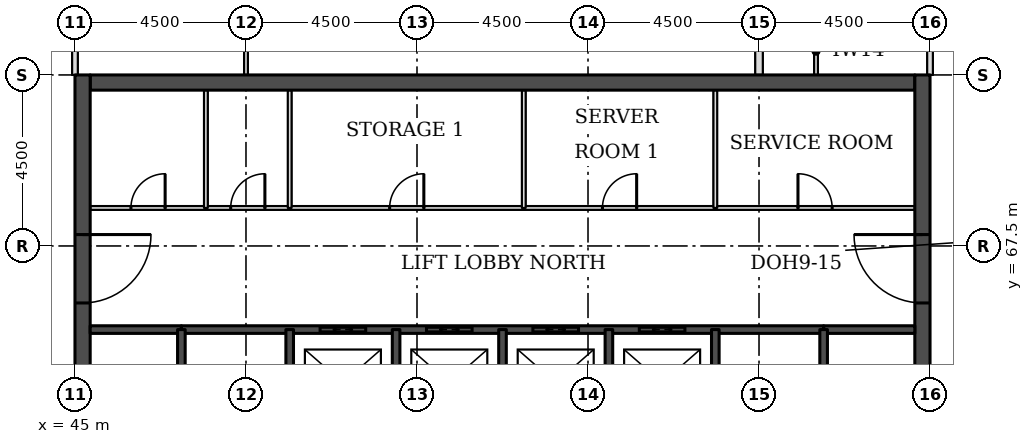
"""IFC4 building model, lengths in metres.
Left out: names, types, materials, properties, quantities, classifications, styles, units other than length and angle.
Written with IfcOpenShell. Run it as: python <this file> out.ifc"""

import sys

from ifc_helpers import new_model, si_unit, direction, frame, frame_2d, origin, place, context, subcontext, project, spatial, rectangle, extrude, element, fill, save


model = new_model("IFC4")
c1 = context("Model", 3, precision=1e-05, world=origin(), true_north=direction((0.0, 1.0)))
c2 = subcontext(c1, "Body", "Model", "MODEL_VIEW")
j1 = project(units=[si_unit("LENGTHUNIT", "METRE"), si_unit("PLANEANGLEUNIT", "RADIAN")], contexts=[c1])
p1 = place(None, origin())
s1 = spatial("IfcSite", under=j1, at=p1, CompositionType="ELEMENT")
p2 = place(p1, origin())
s2 = spatial("IfcBuilding", under=s1, at=p2, CompositionType="ELEMENT")
p3 = place(p2, frame((0.0, 0.0, 215.6)))
s3 = spatial("IfcBuildingStorey", under=s2, at=p3, CompositionType="ELEMENT", Elevation=215.6)
p4 = place(p3, frame((45.4, 71.8, 0.0), z_axis=(0.0, 0.0, 1.0), x_axis=(1.0, 0.0, 0.0)))
e1 = element("IfcWall", 1, at=p4, inside=s3, PredefinedType="SHEAR", context=c2, shape_type="SweptSolid", body=[
    extrude(rectangle(XDim=21.7, YDim=0.4, at=frame_2d((10.85, 0.0))), origin(), (0.0, 0.0, 1.0), 3.7),
])
p5 = place(p3, frame((45.2, 49.5, 0.0), z_axis=(0.0, 0.0, 1.0), x_axis=(0.0, 1.0, 0.0)))
e2 = element("IfcWall", 2, at=p5, inside=s3, PredefinedType="SHEAR", context=c2, shape_type="SweptSolid", body=[
    extrude(rectangle(XDim=22.5, YDim=0.4, at=frame_2d((11.25, 0.0))), origin(), (0.0, 0.0, 1.0), 3.7),
])
p6 = place(p5, frame((4.2, 0.0, 0.0)))
e3 = element("IfcOpeningElement", 3, at=p6, cuts=e2, PredefinedType="OPENING", context=c2, shape_type="SweptSolid", body=[
    extrude(rectangle(XDim=1.8, YDim=2.1, at=frame_2d((0.9, 1.05))), frame((0.0, 0.21, 0.0), z_axis=(0.0, -1.0, 0.0), x_axis=(1.0, 0.0, 0.0)), (0.0, 0.0, 1.0), 0.42),
])
p7 = place(p5, frame((6.9, 0.0, 0.0)))
e4 = element("IfcOpeningElement", 4, at=p7, cuts=e2, PredefinedType="OPENING", context=c2, shape_type="SweptSolid", body=[
    extrude(rectangle(XDim=1.1, YDim=2.1, at=frame_2d((0.55, 1.05))), frame((0.0, 0.21, 0.0), z_axis=(0.0, -1.0, 0.0), x_axis=(1.0, 0.0, 0.0)), (0.0, 0.0, 1.0), 0.42),
])
p8 = place(p5, frame((13.6, 0.0, 0.0)))
e5 = element("IfcOpeningElement", 5, at=p8, cuts=e2, PredefinedType="OPENING", context=c2, shape_type="SweptSolid", body=[
    extrude(rectangle(XDim=1.1, YDim=2.1, at=frame_2d((0.55, 1.05))), frame((0.0, 0.21, 0.0), z_axis=(0.0, -1.0, 0.0), x_axis=(1.0, 0.0, 0.0)), (0.0, 0.0, 1.0), 0.42),
])
p9 = place(p5, frame((16.5, 0.0, 0.0)))
e6 = element("IfcOpeningElement", 6, at=p9, cuts=e2, PredefinedType="OPENING", context=c2, shape_type="SweptSolid", body=[
    extrude(rectangle(XDim=1.8, YDim=2.1, at=frame_2d((0.9, 1.05))), frame((0.0, 0.21, 0.0), z_axis=(0.0, -1.0, 0.0), x_axis=(1.0, 0.0, 0.0)), (0.0, 0.0, 1.0), 0.42),
])
p10 = place(p3, frame((67.3, 49.5, 0.0), z_axis=(0.0, 0.0, 1.0), x_axis=(0.0, 1.0, 0.0)))
e7 = element("IfcWall", 7, at=p10, inside=s3, PredefinedType="SHEAR", context=c2, shape_type="SweptSolid", body=[
    extrude(rectangle(XDim=22.5, YDim=0.4, at=frame_2d((11.25, 0.0))), origin(), (0.0, 0.0, 1.0), 3.7),
])
p11 = place(p10, frame((4.2, 0.0, 0.0)))
e8 = element("IfcOpeningElement", 8, at=p11, cuts=e7, PredefinedType="OPENING", context=c2, shape_type="SweptSolid", body=[
    extrude(rectangle(XDim=1.8, YDim=2.1, at=frame_2d((0.9, 1.05))), frame((0.0, 0.21, 0.0), z_axis=(0.0, -1.0, 0.0), x_axis=(1.0, 0.0, 0.0)), (0.0, 0.0, 1.0), 0.42),
])
p12 = place(p10, frame((6.9, 0.0, 0.0)))
e9 = element("IfcOpeningElement", 9, at=p12, cuts=e7, PredefinedType="OPENING", context=c2, shape_type="SweptSolid", body=[
    extrude(rectangle(XDim=1.1, YDim=2.1, at=frame_2d((0.55, 1.05))), frame((0.0, 0.21, 0.0), z_axis=(0.0, -1.0, 0.0), x_axis=(1.0, 0.0, 0.0)), (0.0, 0.0, 1.0), 0.42),
])
p13 = place(p10, frame((13.6, 0.0, 0.0)))
e10 = element("IfcOpeningElement", 10, at=p13, cuts=e7, PredefinedType="OPENING", context=c2, shape_type="SweptSolid", body=[
    extrude(rectangle(XDim=1.1, YDim=2.1, at=frame_2d((0.55, 1.05))), frame((0.0, 0.21, 0.0), z_axis=(0.0, -1.0, 0.0), x_axis=(1.0, 0.0, 0.0)), (0.0, 0.0, 1.0), 0.42),
])
p14 = place(p10, frame((16.5, 0.0, 0.0)))
e11 = element("IfcOpeningElement", 11, at=p14, cuts=e7, PredefinedType="OPENING", context=c2, shape_type="SweptSolid", body=[
    extrude(rectangle(XDim=1.8, YDim=2.1, at=frame_2d((0.9, 1.05))), frame((0.0, 0.21, 0.0), z_axis=(0.0, -1.0, 0.0), x_axis=(1.0, 0.0, 0.0)), (0.0, 0.0, 1.0), 0.42),
])
p15 = place(p3, frame((45.0, 72.0, 0.0), z_axis=(0.0, 0.0, 1.0), x_axis=(0.0, 1.0, 0.0)))
e12 = element("IfcWall", 12, at=p15, inside=s3, PredefinedType="PARTITIONING", context=c2, shape_type="SweptSolid", body=[
    extrude(rectangle(XDim=3.0, YDim=0.15, at=frame_2d((1.5, 0.0))), origin(), (0.0, 0.0, 1.0), 3.022),
])
p16 = place(p3, frame((49.5, 72.0, 0.0), z_axis=(0.0, 0.0, 1.0), x_axis=(0.0, 1.0, 0.0)))
e13 = element("IfcWall", 13, at=p16, inside=s3, PredefinedType="PARTITIONING", context=c2, shape_type="SweptSolid", body=[
    extrude(rectangle(XDim=3.0, YDim=0.1, at=frame_2d((1.5, 0.0))), origin(), (0.0, 0.0, 1.0), 3.55),
])
p17 = place(p3, frame((63.0, 72.0, 0.0), z_axis=(0.0, 0.0, 1.0), x_axis=(0.0, 1.0, 0.0)))
e14 = element("IfcWall", 14, at=p17, inside=s3, PredefinedType="PARTITIONING", context=c2, shape_type="SweptSolid", body=[
    extrude(rectangle(XDim=6.0, YDim=0.2, at=frame_2d((3.0, 0.0))), origin(), (0.0, 0.0, 1.0), 3.55),
])
p18 = place(p3, frame((64.5, 72.0, 0.0), z_axis=(0.0, 0.0, 1.0), x_axis=(0.0, 1.0, 0.0)))
e15 = element("IfcWall", 15, at=p18, inside=s3, PredefinedType="PARTITIONING", context=c2, shape_type="SweptSolid", body=[
    extrude(rectangle(XDim=4.45, YDim=0.1, at=frame_2d((2.225, 0.0))), origin(), (0.0, 0.0, 1.0), 3.55),
])
p19 = place(p3, frame((67.5, 72.0, 0.0), z_axis=(0.0, 0.0, 1.0), x_axis=(0.0, 1.0, 0.0)))
e16 = element("IfcWall", 16, at=p19, inside=s3, PredefinedType="PARTITIONING", context=c2, shape_type="SweptSolid", body=[
    extrude(rectangle(XDim=4.5, YDim=0.15, at=frame_2d((2.25, 0.0))), origin(), (0.0, 0.0, 1.0), 3.022),
])
p20 = place(p19, frame((1.75, 0.0, 0.0)))
e17 = element("IfcOpeningElement", 17, at=p20, cuts=e16, PredefinedType="OPENING", context=c2, shape_type="SweptSolid", body=[
    extrude(rectangle(XDim=1.0, YDim=2.1, at=frame_2d((0.5, 1.05))), frame((0.0, 0.085, 0.0), z_axis=(0.0, -1.0, 0.0), x_axis=(1.0, 0.0, 0.0)), (0.0, 0.0, 1.0), 0.17),
])
for number, where, z_axis, x_axis in (
    (18, (45.4, 65.3, 0.0), (0.0, 0.0, 1.0), (1.0, 0.0, 0.0)),
    (19, (64.7, 65.3, 0.0), (0.0, 0.0, 1.0), (1.0, 0.0, 0.0)),
):
    element("IfcWall", number, at=place(p3, frame(where, z_axis=z_axis, x_axis=x_axis)), inside=s3, PredefinedType="SOLIDWALL", context=c2, shape_type="SweptSolid", body=[
        extrude(rectangle(XDim=2.4, YDim=0.2, at=frame_2d((1.2, 0.0))), origin(), (0.0, 0.0, 1.0), 3.55),
    ])
p21 = place(p3, frame((47.8, 65.3, 0.0), z_axis=(0.0, 0.0, 1.0), x_axis=(1.0, 0.0, 0.0)))
e20 = element("IfcWall", 20, at=p21, inside=s3, PredefinedType="SOLIDWALL", context=c2, shape_type="SweptSolid", body=[
    extrude(rectangle(XDim=16.9, YDim=0.2, at=frame_2d((8.45, 0.0))), origin(), (0.0, 0.0, 1.0), 3.55),
])
p22 = place(p21, frame((3.65, 0.0, 0.0)))
e21 = element("IfcOpeningElement", 21, at=p22, cuts=e20, PredefinedType="OPENING", context=c2, shape_type="SweptSolid", body=[
    extrude(rectangle(XDim=1.2, YDim=2.1, at=frame_2d((0.6, 1.05))), frame((0.0, 0.11, 0.0), z_axis=(0.0, -1.0, 0.0), x_axis=(1.0, 0.0, 0.0)), (0.0, 0.0, 1.0), 0.22),
])
p23 = place(p21, frame((6.45, 0.0, 0.0)))
e22 = element("IfcOpeningElement", 22, at=p23, cuts=e20, PredefinedType="OPENING", context=c2, shape_type="SweptSolid", body=[
    extrude(rectangle(XDim=1.2, YDim=2.1, at=frame_2d((0.6, 1.05))), frame((0.0, 0.11, 0.0), z_axis=(0.0, -1.0, 0.0), x_axis=(1.0, 0.0, 0.0)), (0.0, 0.0, 1.0), 0.22),
])
p24 = place(p21, frame((9.25, 0.0, 0.0)))
e23 = element("IfcOpeningElement", 23, at=p24, cuts=e20, PredefinedType="OPENING", context=c2, shape_type="SweptSolid", body=[
    extrude(rectangle(XDim=1.2, YDim=2.1, at=frame_2d((0.6, 1.05))), frame((0.0, 0.11, 0.0), z_axis=(0.0, -1.0, 0.0), x_axis=(1.0, 0.0, 0.0)), (0.0, 0.0, 1.0), 0.22),
])
p25 = place(p21, frame((12.05, 0.0, 0.0)))
e24 = element("IfcOpeningElement", 24, at=p25, cuts=e20, PredefinedType="OPENING", context=c2, shape_type="SweptSolid", body=[
    extrude(rectangle(XDim=1.2, YDim=2.1, at=frame_2d((0.6, 1.05))), frame((0.0, 0.11, 0.0), z_axis=(0.0, -1.0, 0.0), x_axis=(1.0, 0.0, 0.0)), (0.0, 0.0, 1.0), 0.22),
])
p26 = place(p3, frame((45.4, 68.5, 0.0), z_axis=(0.0, 0.0, 1.0), x_axis=(1.0, 0.0, 0.0)))
e25 = element("IfcWall", 25, at=p26, inside=s3, PredefinedType="PARTITIONING", context=c2, shape_type="SweptSolid", body=[
    extrude(rectangle(XDim=21.7, YDim=0.1, at=frame_2d((10.85, 0.0))), origin(), (0.0, 0.0, 1.0), 3.55),
])
p27 = place(p26, frame((18.625, 0.0, 0.0)))
e26 = element("IfcOpeningElement", 26, at=p27, cuts=e25, PredefinedType="OPENING", context=c2, shape_type="SweptSolid", body=[
    extrude(rectangle(XDim=0.9, YDim=2.1, at=frame_2d((0.45, 1.05))), frame((0.0, 0.06, 0.0), z_axis=(0.0, -1.0, 0.0), x_axis=(1.0, 0.0, 0.0)), (0.0, 0.0, 1.0), 0.12),
])
p28 = place(p26, frame((1.073, 0.0, 0.0)))
e27 = element("IfcOpeningElement", 27, at=p28, cuts=e25, PredefinedType="OPENING", context=c2, shape_type="SweptSolid", body=[
    extrude(rectangle(XDim=0.9, YDim=2.1, at=frame_2d((0.45, 1.05))), frame((0.0, 0.06, 0.0), z_axis=(0.0, -1.0, 0.0), x_axis=(1.0, 0.0, 0.0)), (0.0, 0.0, 1.0), 0.12),
])
p29 = place(p26, frame((3.698, 0.0, 0.0)))
e28 = element("IfcOpeningElement", 28, at=p29, cuts=e25, PredefinedType="OPENING", context=c2, shape_type="SweptSolid", body=[
    extrude(rectangle(XDim=0.9, YDim=2.1, at=frame_2d((0.45, 1.05))), frame((0.0, 0.06, 0.0), z_axis=(0.0, -1.0, 0.0), x_axis=(1.0, 0.0, 0.0)), (0.0, 0.0, 1.0), 0.12),
])
p30 = place(p26, frame((13.48, 0.0, 0.0)))
e29 = element("IfcOpeningElement", 29, at=p30, cuts=e25, PredefinedType="OPENING", context=c2, shape_type="SweptSolid", body=[
    extrude(rectangle(XDim=0.9, YDim=2.1, at=frame_2d((0.45, 1.05))), frame((0.0, 0.06, 0.0), z_axis=(0.0, -1.0, 0.0), x_axis=(1.0, 0.0, 0.0)), (0.0, 0.0, 1.0), 0.12),
])
p31 = place(p26, frame((7.88, 0.0, 0.0)))
e30 = element("IfcOpeningElement", 30, at=p31, cuts=e25, PredefinedType="OPENING", context=c2, shape_type="SweptSolid", body=[
    extrude(rectangle(XDim=0.9, YDim=2.1, at=frame_2d((0.45, 1.05))), frame((0.0, 0.06, 0.0), z_axis=(0.0, -1.0, 0.0), x_axis=(1.0, 0.0, 0.0)), (0.0, 0.0, 1.0), 0.12),
])
p32 = place(p3, frame((47.8, 62.0, 0.0), z_axis=(0.0, 0.0, 1.0), x_axis=(0.0, 1.0, 0.0)))
e31 = element("IfcWall", 31, at=p32, inside=s3, PredefinedType="SOLIDWALL", context=c2, shape_type="SweptSolid", body=[
    extrude(rectangle(XDim=3.3, YDim=0.2, at=frame_2d((1.65, 0.0))), origin(), (0.0, 0.0, 1.0), 3.55),
])
p33 = place(p32, frame((1.1, 0.0, 0.0)))
e32 = element("IfcOpeningElement", 32, at=p33, cuts=e31, PredefinedType="OPENING", context=c2, shape_type="SweptSolid", body=[
    extrude(rectangle(XDim=1.1, YDim=2.1, at=frame_2d((0.55, 1.05))), frame((0.0, 0.11, 0.0), z_axis=(0.0, -1.0, 0.0), x_axis=(1.0, 0.0, 0.0)), (0.0, 0.0, 1.0), 0.22),
])
for number, where, z_axis, x_axis in (
    (33, (48.445, 68.5, 0.0), (0.0, 0.0, 1.0), (0.0, 1.0, 0.0)),
    (34, (50.65, 68.5, 0.0), (0.0, 0.0, 1.0), (0.0, 1.0, 0.0)),
):
    element("IfcWall", number, at=place(p3, frame(where, z_axis=z_axis, x_axis=x_axis)), inside=s3, PredefinedType="PARTITIONING", context=c2, shape_type="SweptSolid", body=[
        extrude(rectangle(XDim=3.1, YDim=0.1, at=frame_2d((1.55, 0.0))), origin(), (0.0, 0.0, 1.0), 3.55),
    ])
p34 = place(p3, frame((50.65, 62.0, 0.0), z_axis=(0.0, 0.0, 1.0), x_axis=(0.0, 1.0, 0.0)))
e35 = element("IfcWall", 35, at=p34, inside=s3, PredefinedType="SOLIDWALL", context=c2, shape_type="SweptSolid", body=[
    extrude(rectangle(XDim=3.3, YDim=0.2, at=frame_2d((1.65, 0.0))), origin(), (0.0, 0.0, 1.0), 3.55),
])
for number, where, z_axis, x_axis in (
    (36, (53.45, 62.5, 0.0), (0.0, 0.0, 1.0), (0.0, 1.0, 0.0)),
    (37, (56.25, 62.5, 0.0), (0.0, 0.0, 1.0), (0.0, 1.0, 0.0)),
):
    element("IfcWall", number, at=place(p3, frame(where, z_axis=z_axis, x_axis=x_axis)), inside=s3, PredefinedType="SOLIDWALL", context=c2, shape_type="SweptSolid", body=[
        extrude(rectangle(XDim=2.8, YDim=0.2, at=frame_2d((1.4, 0.0))), origin(), (0.0, 0.0, 1.0), 3.55),
    ])
p35 = place(p3, frame((56.81, 68.5, 0.0), z_axis=(0.0, 0.0, 1.0), x_axis=(0.0, 1.0, 0.0)))
e38 = element("IfcWall", 38, at=p35, inside=s3, PredefinedType="PARTITIONING", context=c2, shape_type="SweptSolid", body=[
    extrude(rectangle(XDim=3.1, YDim=0.1, at=frame_2d((1.55, 0.0))), origin(), (0.0, 0.0, 1.0), 3.55),
])
p36 = place(p3, frame((59.05, 62.5, 0.0), z_axis=(0.0, 0.0, 1.0), x_axis=(0.0, 1.0, 0.0)))
e39 = element("IfcWall", 39, at=p36, inside=s3, PredefinedType="SOLIDWALL", context=c2, shape_type="SweptSolid", body=[
    extrude(rectangle(XDim=2.8, YDim=0.2, at=frame_2d((1.4, 0.0))), origin(), (0.0, 0.0, 1.0), 3.55),
])
p37 = place(p3, frame((61.85, 68.5, 0.0), z_axis=(0.0, 0.0, 1.0), x_axis=(0.0, 1.0, 0.0)))
e40 = element("IfcWall", 40, at=p37, inside=s3, PredefinedType="PARTITIONING", context=c2, shape_type="SweptSolid", body=[
    extrude(rectangle(XDim=3.1, YDim=0.1, at=frame_2d((1.55, 0.0))), origin(), (0.0, 0.0, 1.0), 3.55),
])
p38 = place(p3, frame((61.85, 62.0, 0.0), z_axis=(0.0, 0.0, 1.0), x_axis=(0.0, 1.0, 0.0)))
e41 = element("IfcWall", 41, at=p38, inside=s3, PredefinedType="SOLIDWALL", context=c2, shape_type="SweptSolid", body=[
    extrude(rectangle(XDim=3.3, YDim=0.2, at=frame_2d((1.65, 0.0))), origin(), (0.0, 0.0, 1.0), 3.55),
])
p39 = place(p3, frame((64.7, 62.0, 0.0), z_axis=(0.0, 0.0, 1.0), x_axis=(0.0, 1.0, 0.0)))
e42 = element("IfcWall", 42, at=p39, inside=s3, PredefinedType="SOLIDWALL", context=c2, shape_type="SweptSolid", body=[
    extrude(rectangle(XDim=3.3, YDim=0.2, at=frame_2d((1.65, 0.0))), origin(), (0.0, 0.0, 1.0), 3.55),
])
p40 = place(p39, frame((1.1, 0.0, 0.0)))
e43 = element("IfcOpeningElement", 43, at=p40, cuts=e42, PredefinedType="OPENING", context=c2, shape_type="SweptSolid", body=[
    extrude(rectangle(XDim=1.1, YDim=2.1, at=frame_2d((0.55, 1.05))), frame((0.0, 0.11, 0.0), z_axis=(0.0, -1.0, 0.0), x_axis=(1.0, 0.0, 0.0)), (0.0, 0.0, 1.0), 0.22),
])
p41 = place(p22, origin())
e44 = element("IfcDoor", 44, at=p41, inside=s3, OperationType="DOUBLE_DOOR_SLIDING", PredefinedType="DOOR", context=c2, shape_type="SweptSolid", body=[
    extrude(rectangle(XDim=1.2, YDim=2.1, at=frame_2d((0.6, 1.05))), frame((0.0, 0.025, 0.0), z_axis=(0.0, -1.0, 0.0), x_axis=(1.0, 0.0, 0.0)), (0.0, 0.0, 1.0), 0.05),
])
fill(e21, e44)
p42 = place(p23, origin())
e45 = element("IfcDoor", 45, at=p42, inside=s3, OperationType="DOUBLE_DOOR_SLIDING", PredefinedType="DOOR", context=c2, shape_type="SweptSolid", body=[
    extrude(rectangle(XDim=1.2, YDim=2.1, at=frame_2d((0.6, 1.05))), frame((0.0, 0.025, 0.0), z_axis=(0.0, -1.0, 0.0), x_axis=(1.0, 0.0, 0.0)), (0.0, 0.0, 1.0), 0.05),
])
fill(e22, e45)
p43 = place(p24, origin())
e46 = element("IfcDoor", 46, at=p43, inside=s3, OperationType="DOUBLE_DOOR_SLIDING", PredefinedType="DOOR", context=c2, shape_type="SweptSolid", body=[
    extrude(rectangle(XDim=1.2, YDim=2.1, at=frame_2d((0.6, 1.05))), frame((0.0, 0.025, 0.0), z_axis=(0.0, -1.0, 0.0), x_axis=(1.0, 0.0, 0.0)), (0.0, 0.0, 1.0), 0.05),
])
fill(e23, e46)
p44 = place(p25, origin())
e47 = element("IfcDoor", 47, at=p44, inside=s3, OperationType="DOUBLE_DOOR_SLIDING", PredefinedType="DOOR", context=c2, shape_type="SweptSolid", body=[
    extrude(rectangle(XDim=1.2, YDim=2.1, at=frame_2d((0.6, 1.05))), frame((0.0, 0.025, 0.0), z_axis=(0.0, -1.0, 0.0), x_axis=(1.0, 0.0, 0.0)), (0.0, 0.0, 1.0), 0.05),
])
fill(e24, e47)
p45 = place(p9, frame((1.8, 0.0, 0.0), z_axis=(0.0, 0.0, 1.0), x_axis=(-1.0, 0.0, 0.0)))
e48 = element("IfcDoor", 48, at=p45, inside=s3, OperationType="SINGLE_SWING_LEFT", PredefinedType="DOOR", context=c2, shape_type="SweptSolid", body=[
    extrude(rectangle(XDim=1.8, YDim=2.1, at=frame_2d((0.9, 1.05))), frame((0.0, 0.025, 0.0), z_axis=(0.0, -1.0, 0.0), x_axis=(1.0, 0.0, 0.0)), (0.0, 0.0, 1.0), 0.05),
])
fill(e6, e48)
p46 = place(p14, origin())
e49 = element("IfcDoor", 49, at=p46, inside=s3, OperationType="SINGLE_SWING_RIGHT", PredefinedType="DOOR", context=c2, shape_type="SweptSolid", body=[
    extrude(rectangle(XDim=1.8, YDim=2.1, at=frame_2d((0.9, 1.05))), frame((0.0, 0.025, 0.0), z_axis=(0.0, -1.0, 0.0), x_axis=(1.0, 0.0, 0.0)), (0.0, 0.0, 1.0), 0.05),
])
fill(e11, e49)
p47 = place(p27, origin())
e50 = element("IfcDoor", 50, at=p47, inside=s3, OperationType="SINGLE_SWING_LEFT", PredefinedType="DOOR", context=c2, shape_type="SweptSolid", body=[
    extrude(rectangle(XDim=0.9, YDim=2.1, at=frame_2d((0.45, 1.05))), frame((0.0, 0.025, 0.0), z_axis=(0.0, -1.0, 0.0), x_axis=(1.0, 0.0, 0.0)), (0.0, 0.0, 1.0), 0.05),
])
fill(e26, e50)
p48 = place(p28, origin())
e51 = element("IfcDoor", 51, at=p48, inside=s3, OperationType="SINGLE_SWING_RIGHT", PredefinedType="DOOR", context=c2, shape_type="SweptSolid", body=[
    extrude(rectangle(XDim=0.9, YDim=2.1, at=frame_2d((0.45, 1.05))), frame((0.0, 0.025, 0.0), z_axis=(0.0, -1.0, 0.0), x_axis=(1.0, 0.0, 0.0)), (0.0, 0.0, 1.0), 0.05),
])
fill(e27, e51)
p49 = place(p29, origin())
e52 = element("IfcDoor", 52, at=p49, inside=s3, OperationType="SINGLE_SWING_RIGHT", PredefinedType="DOOR", context=c2, shape_type="SweptSolid", body=[
    extrude(rectangle(XDim=0.9, YDim=2.1, at=frame_2d((0.45, 1.05))), frame((0.0, 0.025, 0.0), z_axis=(0.0, -1.0, 0.0), x_axis=(1.0, 0.0, 0.0)), (0.0, 0.0, 1.0), 0.05),
])
fill(e28, e52)
p50 = place(p30, origin())
e53 = element("IfcDoor", 53, at=p50, inside=s3, OperationType="SINGLE_SWING_RIGHT", PredefinedType="DOOR", context=c2, shape_type="SweptSolid", body=[
    extrude(rectangle(XDim=0.9, YDim=2.1, at=frame_2d((0.45, 1.05))), frame((0.0, 0.025, 0.0), z_axis=(0.0, -1.0, 0.0), x_axis=(1.0, 0.0, 0.0)), (0.0, 0.0, 1.0), 0.05),
])
fill(e29, e53)
p51 = place(p31, origin())
e54 = element("IfcDoor", 54, at=p51, inside=s3, OperationType="SINGLE_SWING_RIGHT", PredefinedType="DOOR", context=c2, shape_type="SweptSolid", body=[
    extrude(rectangle(XDim=0.9, YDim=2.1, at=frame_2d((0.45, 1.05))), frame((0.0, 0.025, 0.0), z_axis=(0.0, -1.0, 0.0), x_axis=(1.0, 0.0, 0.0)), (0.0, 0.0, 1.0), 0.05),
])
fill(e30, e54)
save(model, sys.argv[1])
